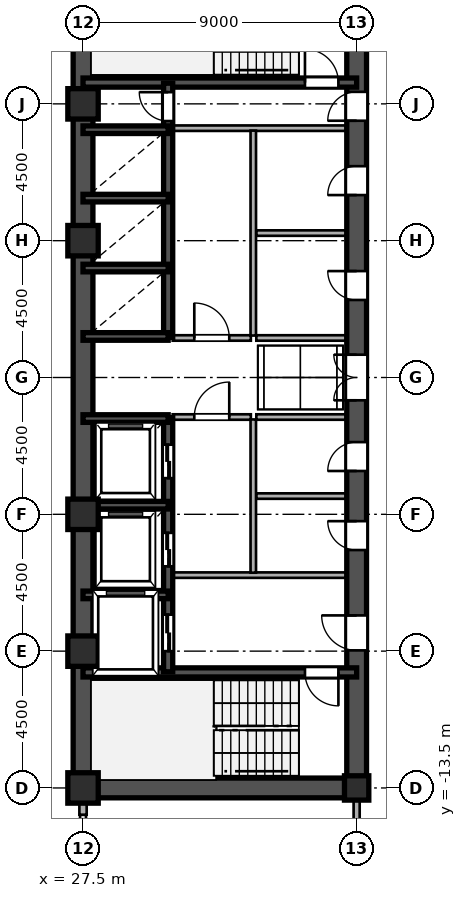
"""IFC4 building model, lengths in metres.
Left out: names, types, materials, properties, quantities, classifications, styles, units other than length and angle.
Written with IfcOpenShell. Run it as: python <this file> out.ifc"""

import sys

from ifc_helpers import new_model, si_unit, direction, frame, frame_2d, origin, origin_2d, place, context, subcontext, project, spatial, rectangle, hollow_rectangle, i_section, extrude, source, transform, mapped, element, fill, save


model = new_model("IFC4")
c1 = context("Model", 3, precision=1e-05, world=origin(), true_north=direction((0.0, 1.0)))
c2 = subcontext(c1, "Body", "Model", "MODEL_VIEW")
j1 = project(units=[si_unit("LENGTHUNIT", "METRE"), si_unit("PLANEANGLEUNIT", "RADIAN")], contexts=[c1])
p1 = place(None, origin())
s1 = spatial("IfcSite", under=j1, at=p1, CompositionType="ELEMENT")
p2 = place(p1, origin())
s2 = spatial("IfcBuilding", under=s1, at=p2, CompositionType="ELEMENT")
p3 = place(p2, frame((0.0, 0.0, 92.4)))
s3 = spatial("IfcBuildingStorey", under=s2, at=p3, CompositionType="ELEMENT", Elevation=92.4)
m1 = source(origin(), c2, "Body", "SweptSolid", [
    extrude(hollow_rectangle(XDim=1.0, YDim=1.0, WallThickness=0.042, at=origin_2d()), origin(), (0.0, 0.0, 1.0), 3.6),
])
for number, where, z_axis, x_axis in (
    (1, (27.5, -13.5, 0.0), (0.0, 0.0, 1.0), (1.0, 0.0, 0.0)),
    (2, (27.5, -9.0, 0.0), (0.0, 0.0, 1.0), (1.0, 0.0, 0.0)),
    (3, (27.5, -4.5, 0.0), (0.0, 0.0, 1.0), (1.0, 0.0, 0.0)),
    (4, (27.5, 4.5, 0.0), (0.0, 0.0, 1.0), (1.0, 0.0, 0.0)),
    (5, (27.5, 9.0, 0.0), (0.0, 0.0, 1.0), (1.0, 0.0, 0.0)),
):
    element("IfcColumn", number, at=place(p3, frame(where, z_axis=z_axis, x_axis=x_axis)), inside=s3, PredefinedType="COLUMN", context=c2, shape_type="MappedRepresentation", body=[
        mapped(m1, transform((0.0, 0.0, 0.0), scale=1.0)),
    ])
m2 = source(origin(), c2, "Body", "SweptSolid", [
    extrude(i_section(OverallWidth=0.8, OverallDepth=0.8, WebThickness=0.032, FlangeThickness=0.05, at=origin_2d()), origin(), (0.0, 0.0, 1.0), 3.6),
])
p4 = place(p3, frame((36.5, -13.5, 0.0), z_axis=(0.0, 0.0, 1.0), x_axis=(1.0, 0.0, 0.0)))
e6 = element("IfcColumn", 6, at=p4, inside=s3, PredefinedType="COLUMN", context=c2, shape_type="MappedRepresentation", body=[
    mapped(m2, transform((0.0, 0.0, 0.0), scale=1.0)),
])
p5 = place(p3, frame((27.5, -14.38, 0.0), z_axis=(0.0, 0.0, 1.0), x_axis=(0.0, 1.0, 0.0)))
e7 = element("IfcWall", 7, at=p5, inside=s3, PredefinedType="SOLIDWALL", context=c2, shape_type="SweptSolid", body=[
    extrude(rectangle(XDim=0.55, YDim=0.24, at=frame_2d((0.275, 0.0))), origin(), (0.0, 0.0, 1.0), 2.88),
])
for number, where, z_axis, x_axis in (
    (8, (27.5, -13.5, 0.0), (0.0, 0.0, 1.0), (0.0, 1.0, 0.0)),
    (9, (27.5, 1.3, 0.0), (0.0, 0.0, 1.0), (0.0, 1.0, 0.0)),
):
    element("IfcWall", number, at=place(p3, frame(where, z_axis=z_axis, x_axis=x_axis)), inside=s3, PredefinedType="SHEAR", context=c2, shape_type="SweptSolid", body=[
        extrude(rectangle(XDim=12.2, YDim=0.65, at=frame_2d((6.1, 0.0))), origin(), (0.0, 0.0, 1.0), 3.38),
    ])
p6 = place(p3, frame((27.5, -1.3, 0.0), z_axis=(0.0, 0.0, 1.0), x_axis=(0.0, 1.0, 0.0)))
e10 = element("IfcWall", 10, at=p6, inside=s3, PredefinedType="SHEAR", context=c2, shape_type="SweptSolid", body=[
    extrude(rectangle(XDim=2.6, YDim=0.65, at=frame_2d((1.3, 0.0))), origin(), (0.0, 0.0, 1.0), 3.38),
])
p7 = place(p3, frame((27.5, -13.5, 0.0), z_axis=(0.0, 0.0, 1.0), x_axis=(1.0, 0.0, 0.0)))
e11 = element("IfcWall", 11, at=p7, inside=s3, PredefinedType="SHEAR", context=c2, shape_type="SweptSolid", body=[
    extrude(rectangle(XDim=9.0, YDim=0.65, at=frame_2d((4.5, 0.0))), origin(), (0.0, 0.0, 1.0), 3.38),
])
p8 = place(p3, frame((36.5, -13.65, 0.0), z_axis=(0.0, 0.0, 1.0), x_axis=(0.0, 1.0, 0.0)))
e12 = element("IfcWall", 12, at=p8, inside=s3, PredefinedType="SHEAR", context=c2, shape_type="SweptSolid", body=[
    extrude(rectangle(XDim=7.15, YDim=0.65, at=frame_2d((3.575, 0.0))), origin(), (0.0, 0.0, 1.0), 3.38),
])
p9 = place(p8, frame((4.675, 0.0, 0.0)))
e13 = element("IfcOpeningElement", 13, at=p9, cuts=e12, PredefinedType="OPENING", context=c2, shape_type="SweptSolid", body=[
    extrude(rectangle(XDim=1.15, YDim=2.2, at=frame_2d((0.575, 1.1))), frame((0.0, 0.335, 0.0), z_axis=(0.0, -1.0, 0.0), x_axis=(1.0, 0.0, 0.0)), (0.0, 0.0, 1.0), 0.67),
])
p10 = place(p3, frame((36.5, -1.3, 0.0), z_axis=(0.0, 0.0, 1.0), x_axis=(0.0, 1.0, 0.0)))
e14 = element("IfcWall", 14, at=p10, inside=s3, PredefinedType="SHEAR", context=c2, shape_type="SweptSolid", body=[
    extrude(rectangle(XDim=2.6, YDim=0.65, at=frame_2d((1.3, 0.0))), origin(), (0.0, 0.0, 1.0), 3.38),
])
p11 = place(p10, frame((0.55, 0.0, 0.0)))
e15 = element("IfcOpeningElement", 15, at=p11, cuts=e14, PredefinedType="OPENING", context=c2, shape_type="SweptSolid", body=[
    extrude(rectangle(XDim=1.5, YDim=2.3, at=frame_2d((0.75, 1.15))), frame((0.0, 0.335, 0.0), z_axis=(0.0, -1.0, 0.0), x_axis=(1.0, 0.0, 0.0)), (0.0, 0.0, 1.0), 0.67),
])
p12 = place(p3, frame((36.5, 8.2, 0.0), z_axis=(0.0, 0.0, 1.0), x_axis=(0.0, 1.0, 0.0)))
e16 = element("IfcWall", 16, at=p12, inside=s3, PredefinedType="SHEAR", context=c2, shape_type="SweptSolid", body=[
    extrude(rectangle(XDim=5.45, YDim=0.65, at=frame_2d((2.725, 0.0))), origin(), (0.0, 0.0, 1.0), 3.38),
])
p13 = place(p12, frame((0.245, 0.0, 0.0)))
e17 = element("IfcOpeningElement", 17, at=p13, cuts=e16, PredefinedType="OPENING", context=c2, shape_type="SweptSolid", body=[
    extrude(rectangle(XDim=0.95, YDim=2.15, at=frame_2d((0.475, 1.075))), frame((0.0, 0.335, 0.0), z_axis=(0.0, -1.0, 0.0), x_axis=(1.0, 0.0, 0.0)), (0.0, 0.0, 1.0), 0.67),
])
p14 = place(p3, frame((36.5, -6.5, 0.0), z_axis=(0.0, 0.0, 1.0), x_axis=(0.0, 1.0, 0.0)))
e18 = element("IfcWall", 18, at=p14, inside=s3, PredefinedType="SHEAR", context=c2, shape_type="SweptSolid", body=[
    extrude(rectangle(XDim=2.6, YDim=0.65, at=frame_2d((1.3, 0.0))), origin(), (0.0, 0.0, 1.0), 3.38),
])
p15 = place(p14, frame((0.825, 0.0, 0.0)))
e19 = element("IfcOpeningElement", 19, at=p15, cuts=e18, PredefinedType="OPENING", context=c2, shape_type="SweptSolid", body=[
    extrude(rectangle(XDim=0.95, YDim=2.15, at=frame_2d((0.475, 1.075))), frame((0.0, 0.335, 0.0), z_axis=(0.0, -1.0, 0.0), x_axis=(1.0, 0.0, 0.0)), (0.0, 0.0, 1.0), 0.67),
])
p16 = place(p3, frame((36.5, -3.9, 0.0), z_axis=(0.0, 0.0, 1.0), x_axis=(0.0, 1.0, 0.0)))
e20 = element("IfcWall", 20, at=p16, inside=s3, PredefinedType="SHEAR", context=c2, shape_type="SweptSolid", body=[
    extrude(rectangle(XDim=2.6, YDim=0.65, at=frame_2d((1.3, 0.0))), origin(), (0.0, 0.0, 1.0), 3.38),
])
p17 = place(p16, frame((0.825, 0.0, 0.0)))
e21 = element("IfcOpeningElement", 21, at=p17, cuts=e20, PredefinedType="OPENING", context=c2, shape_type="SweptSolid", body=[
    extrude(rectangle(XDim=0.95, YDim=2.15, at=frame_2d((0.475, 1.075))), frame((0.0, 0.335, 0.0), z_axis=(0.0, -1.0, 0.0), x_axis=(1.0, 0.0, 0.0)), (0.0, 0.0, 1.0), 0.67),
])
p18 = place(p3, frame((36.5, 1.3, 0.0), z_axis=(0.0, 0.0, 1.0), x_axis=(0.0, 1.0, 0.0)))
e22 = element("IfcWall", 22, at=p18, inside=s3, PredefinedType="SHEAR", context=c2, shape_type="SweptSolid", body=[
    extrude(rectangle(XDim=3.45, YDim=0.65, at=frame_2d((1.725, 0.0))), origin(), (0.0, 0.0, 1.0), 3.38),
])
p19 = place(p18, frame((1.25, 0.0, 0.0)))
e23 = element("IfcOpeningElement", 23, at=p19, cuts=e22, PredefinedType="OPENING", context=c2, shape_type="SweptSolid", body=[
    extrude(rectangle(XDim=0.95, YDim=2.15, at=frame_2d((0.475, 1.075))), frame((0.0, 0.335, 0.0), z_axis=(0.0, -1.0, 0.0), x_axis=(1.0, 0.0, 0.0)), (0.0, 0.0, 1.0), 0.67),
])
p20 = place(p3, frame((36.5, 4.75, 0.0), z_axis=(0.0, 0.0, 1.0), x_axis=(0.0, 1.0, 0.0)))
e24 = element("IfcWall", 24, at=p20, inside=s3, PredefinedType="SHEAR", context=c2, shape_type="SweptSolid", body=[
    extrude(rectangle(XDim=3.45, YDim=0.65, at=frame_2d((1.725, 0.0))), origin(), (0.0, 0.0, 1.0), 3.38),
])
p21 = place(p20, frame((1.25, 0.0, 0.0)))
e25 = element("IfcOpeningElement", 25, at=p21, cuts=e24, PredefinedType="OPENING", context=c2, shape_type="SweptSolid", body=[
    extrude(rectangle(XDim=0.95, YDim=2.15, at=frame_2d((0.475, 1.075))), frame((0.0, 0.335, 0.0), z_axis=(0.0, -1.0, 0.0), x_axis=(1.0, 0.0, 0.0)), (0.0, 0.0, 1.0), 0.67),
])
p22 = place(p3, frame((27.5, -9.7, 0.0), z_axis=(0.0, 0.0, 1.0), x_axis=(1.0, 0.0, 0.0)))
e26 = element("IfcWall", 26, at=p22, inside=s3, PredefinedType="SHEAR", context=c2, shape_type="SweptSolid", body=[
    extrude(rectangle(XDim=9.0, YDim=0.3, at=frame_2d((4.5, 0.0))), origin(), (0.0, 0.0, 1.0), 3.38),
])
p23 = place(p22, frame((7.3, 0.0, 0.0)))
e27 = element("IfcOpeningElement", 27, at=p23, cuts=e26, PredefinedType="OPENING", context=c2, shape_type="SweptSolid", body=[
    extrude(rectangle(XDim=1.1, YDim=2.2, at=frame_2d((0.55, 1.1))), frame((0.0, 0.16, 0.0), z_axis=(0.0, -1.0, 0.0), x_axis=(1.0, 0.0, 0.0)), (0.0, 0.0, 1.0), 0.32),
])
p24 = place(p3, frame((27.5, 9.7, 0.0), z_axis=(0.0, 0.0, 1.0), x_axis=(1.0, 0.0, 0.0)))
e28 = element("IfcWall", 28, at=p24, inside=s3, PredefinedType="SHEAR", context=c2, shape_type="SweptSolid", body=[
    extrude(rectangle(XDim=9.0, YDim=0.3, at=frame_2d((4.5, 0.0))), origin(), (0.0, 0.0, 1.0), 3.38),
])
p25 = place(p24, frame((7.3, 0.0, 0.0)))
e29 = element("IfcOpeningElement", 29, at=p25, cuts=e28, PredefinedType="OPENING", context=c2, shape_type="SweptSolid", body=[
    extrude(rectangle(XDim=1.1, YDim=2.2, at=frame_2d((0.55, 1.1))), frame((0.0, 0.16, 0.0), z_axis=(0.0, -1.0, 0.0), x_axis=(1.0, 0.0, 0.0)), (0.0, 0.0, 1.0), 0.32),
])
for number, where, z_axis, x_axis in (
    (30, (27.5, -7.15, 0.0), (0.0, 0.0, 1.0), (1.0, 0.0, 0.0)),
    (31, (27.5, -4.2, 0.0), (0.0, 0.0, 1.0), (1.0, 0.0, 0.0)),
    (32, (27.5, -1.35, 0.0), (0.0, 0.0, 1.0), (1.0, 0.0, 0.0)),
    (33, (27.5, 1.35, 0.0), (0.0, 0.0, 1.0), (1.0, 0.0, 0.0)),
    (34, (27.5, 3.6, 0.0), (0.0, 0.0, 1.0), (1.0, 0.0, 0.0)),
    (35, (27.5, 5.9, 0.0), (0.0, 0.0, 1.0), (1.0, 0.0, 0.0)),
    (36, (27.5, 8.15, 0.0), (0.0, 0.0, 1.0), (1.0, 0.0, 0.0)),
):
    element("IfcWall", number, at=place(p3, frame(where, z_axis=z_axis, x_axis=x_axis)), inside=s3, PredefinedType="SHEAR", context=c2, shape_type="SweptSolid", body=[
        extrude(rectangle(XDim=2.8, YDim=0.25, at=frame_2d((1.4, 0.0))), origin(), (0.0, 0.0, 1.0), 3.38),
    ])
p26 = place(p3, frame((30.3, -9.68, 0.0), z_axis=(0.0, 0.0, 1.0), x_axis=(0.0, 1.0, 0.0)))
e37 = element("IfcWall", 37, at=p26, inside=s3, PredefinedType="SHEAR", context=c2, shape_type="SweptSolid", body=[
    extrude(rectangle(XDim=2.56, YDim=0.3, at=frame_2d((1.28, 0.0))), origin(), (0.0, 0.0, 1.0), 3.38),
])
p27 = place(p26, frame((0.68, 0.0, 0.0)))
e38 = element("IfcOpeningElement", 38, at=p27, cuts=e37, PredefinedType="OPENING", context=c2, shape_type="SweptSolid", body=[
    extrude(rectangle(XDim=1.2, YDim=2.25, at=frame_2d((0.6, 1.125))), frame((0.0, 0.16, 0.0), z_axis=(0.0, -1.0, 0.0), x_axis=(1.0, 0.0, 0.0)), (0.0, 0.0, 1.0), 0.32),
])
p28 = place(p3, frame((30.3, -7.12, 0.0), z_axis=(0.0, 0.0, 1.0), x_axis=(0.0, 1.0, 0.0)))
e39 = element("IfcWall", 39, at=p28, inside=s3, PredefinedType="SHEAR", context=c2, shape_type="SweptSolid", body=[
    extrude(rectangle(XDim=2.92, YDim=0.3, at=frame_2d((1.46, 0.0))), origin(), (0.0, 0.0, 1.0), 3.38),
])
p29 = place(p28, frame((0.91, 0.0, 0.0)))
e40 = element("IfcOpeningElement", 40, at=p29, cuts=e39, PredefinedType="OPENING", context=c2, shape_type="SweptSolid", body=[
    extrude(rectangle(XDim=1.1, YDim=2.2, at=frame_2d((0.55, 1.1))), frame((0.0, 0.16, 0.0), z_axis=(0.0, -1.0, 0.0), x_axis=(1.0, 0.0, 0.0)), (0.0, 0.0, 1.0), 0.32),
])
p30 = place(p3, frame((30.3, -4.2, 0.0), z_axis=(0.0, 0.0, 1.0), x_axis=(0.0, 1.0, 0.0)))
e41 = element("IfcWall", 41, at=p30, inside=s3, PredefinedType="SHEAR", context=c2, shape_type="SweptSolid", body=[
    extrude(rectangle(XDim=2.88, YDim=0.3, at=frame_2d((1.44, 0.0))), origin(), (0.0, 0.0, 1.0), 3.38),
])
p31 = place(p30, frame((0.89, 0.0, 0.0)))
e42 = element("IfcOpeningElement", 42, at=p31, cuts=e41, PredefinedType="OPENING", context=c2, shape_type="SweptSolid", body=[
    extrude(rectangle(XDim=1.1, YDim=2.2, at=frame_2d((0.55, 1.1))), frame((0.0, 0.16, 0.0), z_axis=(0.0, -1.0, 0.0), x_axis=(1.0, 0.0, 0.0)), (0.0, 0.0, 1.0), 0.32),
])
p32 = place(p3, frame((30.3, 1.32, 0.0), z_axis=(0.0, 0.0, 1.0), x_axis=(0.0, 1.0, 0.0)))
e43 = element("IfcWall", 43, at=p32, inside=s3, PredefinedType="SHEAR", context=c2, shape_type="SweptSolid", body=[
    extrude(rectangle(XDim=2.28, YDim=0.3, at=frame_2d((1.14, 0.0))), origin(), (0.0, 0.0, 1.0), 3.38),
])
p33 = place(p3, frame((30.3, 3.6, 0.0), z_axis=(0.0, 0.0, 1.0), x_axis=(0.0, 1.0, 0.0)))
e44 = element("IfcWall", 44, at=p33, inside=s3, PredefinedType="SHEAR", context=c2, shape_type="SweptSolid", body=[
    extrude(rectangle(XDim=2.3, YDim=0.3, at=frame_2d((1.15, 0.0))), origin(), (0.0, 0.0, 1.0), 3.38),
])
p34 = place(p3, frame((30.3, 5.9, 0.0), z_axis=(0.0, 0.0, 1.0), x_axis=(0.0, 1.0, 0.0)))
e45 = element("IfcWall", 45, at=p34, inside=s3, PredefinedType="SHEAR", context=c2, shape_type="SweptSolid", body=[
    extrude(rectangle(XDim=2.25, YDim=0.3, at=frame_2d((1.125, 0.0))), origin(), (0.0, 0.0, 1.0), 3.38),
])
p35 = place(p3, frame((30.3, 8.15, 0.0), z_axis=(0.0, 0.0, 1.0), x_axis=(0.0, 1.0, 0.0)))
e46 = element("IfcWall", 46, at=p35, inside=s3, PredefinedType="SHEAR", context=c2, shape_type="SweptSolid", body=[
    extrude(rectangle(XDim=1.53, YDim=0.3, at=frame_2d((0.765, 0.0))), origin(), (0.0, 0.0, 1.0), 3.38),
])
p36 = place(p35, frame((0.285, 0.0, 0.0)))
e47 = element("IfcOpeningElement", 47, at=p36, cuts=e46, PredefinedType="OPENING", context=c2, shape_type="SweptSolid", body=[
    extrude(rectangle(XDim=0.95, YDim=2.15, at=frame_2d((0.475, 1.075))), frame((0.0, 0.16, 0.0), z_axis=(0.0, -1.0, 0.0), x_axis=(1.0, 0.0, 0.0)), (0.0, 0.0, 1.0), 0.32),
])
for number, where, z_axis, x_axis in (
    (48, (30.45, -6.5, 0.0), (0.0, 0.0, 1.0), (1.0, 0.0, 0.0)),
    (49, (30.45, 8.2, 0.0), (0.0, 0.0, 1.0), (1.0, 0.0, 0.0)),
):
    element("IfcWall", number, at=place(p3, frame(where, z_axis=z_axis, x_axis=x_axis)), inside=s3, PredefinedType="PARTITIONING", context=c2, shape_type="SweptSolid", body=[
        extrude(rectangle(XDim=5.7, YDim=0.18, at=frame_2d((2.85, 0.0))), origin(), (0.0, 0.0, 1.0), 3.38),
    ])
p37 = place(p3, frame((33.1, -6.42, 0.0), z_axis=(0.0, 0.0, 1.0), x_axis=(0.0, 1.0, 0.0)))
e50 = element("IfcWall", 50, at=p37, inside=s3, PredefinedType="PARTITIONING", context=c2, shape_type="SweptSolid", body=[
    extrude(rectangle(XDim=5.04, YDim=0.18, at=frame_2d((2.52, 0.0))), origin(), (0.0, 0.0, 1.0), 3.38),
])
p38 = place(p3, frame((33.1, 1.38, 0.0), z_axis=(0.0, 0.0, 1.0), x_axis=(0.0, 1.0, 0.0)))
e51 = element("IfcWall", 51, at=p38, inside=s3, PredefinedType="PARTITIONING", context=c2, shape_type="SweptSolid", body=[
    extrude(rectangle(XDim=6.74, YDim=0.18, at=frame_2d((3.37, 0.0))), origin(), (0.0, 0.0, 1.0), 3.38),
])
p39 = place(p3, frame((30.45, -1.3, 0.0), z_axis=(0.0, 0.0, 1.0), x_axis=(1.0, 0.0, 0.0)))
e52 = element("IfcWall", 52, at=p39, inside=s3, PredefinedType="PARTITIONING", context=c2, shape_type="SweptSolid", body=[
    extrude(rectangle(XDim=2.57, YDim=0.18, at=frame_2d((1.285, 0.0))), origin(), (0.0, 0.0, 1.0), 3.38),
])
p40 = place(p39, frame((0.71, 0.0, 0.0)))
e53 = element("IfcOpeningElement", 53, at=p40, cuts=e52, PredefinedType="OPENING", context=c2, shape_type="SweptSolid", body=[
    extrude(rectangle(XDim=1.15, YDim=2.2, at=frame_2d((0.575, 1.1))), frame((0.0, 0.1, 0.0), z_axis=(0.0, -1.0, 0.0), x_axis=(1.0, 0.0, 0.0)), (0.0, 0.0, 1.0), 0.2),
])
p41 = place(p3, frame((30.45, 1.3, 0.0), z_axis=(0.0, 0.0, 1.0), x_axis=(1.0, 0.0, 0.0)))
e54 = element("IfcWall", 54, at=p41, inside=s3, PredefinedType="PARTITIONING", context=c2, shape_type="SweptSolid", body=[
    extrude(rectangle(XDim=2.57, YDim=0.18, at=frame_2d((1.285, 0.0))), origin(), (0.0, 0.0, 1.0), 3.38),
])
p42 = place(p41, frame((0.71, 0.0, 0.0)))
e55 = element("IfcOpeningElement", 55, at=p42, cuts=e54, PredefinedType="OPENING", context=c2, shape_type="SweptSolid", body=[
    extrude(rectangle(XDim=1.15, YDim=2.2, at=frame_2d((0.575, 1.1))), frame((0.0, 0.1, 0.0), z_axis=(0.0, -1.0, 0.0), x_axis=(1.0, 0.0, 0.0)), (0.0, 0.0, 1.0), 0.2),
])
for number, where, z_axis, x_axis in (
    (56, (33.2, -1.3, 0.0), (0.0, 0.0, 1.0), (1.0, 0.0, 0.0)),
    (57, (33.2, 1.3, 0.0), (0.0, 0.0, 1.0), (1.0, 0.0, 0.0)),
    (58, (33.2, -3.9, 0.0), (0.0, 0.0, 1.0), (1.0, 0.0, 0.0)),
    (59, (33.2, 4.75, 0.0), (0.0, 0.0, 1.0), (1.0, 0.0, 0.0)),
):
    element("IfcWall", number, at=place(p3, frame(where, z_axis=z_axis, x_axis=x_axis)), inside=s3, PredefinedType="PARTITIONING", context=c2, shape_type="SweptSolid", body=[
        extrude(rectangle(XDim=2.95, YDim=0.18, at=frame_2d((1.475, 0.0))), origin(), (0.0, 0.0, 1.0), 3.38),
    ])
p43 = place(p3, frame((36.5, -15.515, 0.0), z_axis=(0.0, 0.0, 1.0), x_axis=(0.0, 1.0, 0.0)))
e60 = element("IfcWall", 60, at=p43, inside=s3, PredefinedType="PARTITIONING", context=c2, shape_type="SweptSolid", body=[
    extrude(rectangle(XDim=1.685, YDim=0.2, at=frame_2d((0.842, 0.0))), origin(), (0.0, 0.0, 1.0), 2.68),
])
m3 = source(origin(), c2, "Body", "SweptSolid", [
    extrude(rectangle(XDim=1.15, YDim=2.2, at=frame_2d((0.575, 1.1))), frame((0.0, 0.025, 0.0), z_axis=(0.0, -1.0, 0.0), x_axis=(1.0, 0.0, 0.0)), (0.0, 0.0, 1.0), 0.05),
])
p44 = place(p9, origin())
e61 = element("IfcDoor", 61, at=p44, inside=s3, OperationType="SINGLE_SWING_RIGHT", PredefinedType="DOOR", context=c2, shape_type="MappedRepresentation", body=[
    mapped(m3, transform((0.0, 0.0, 0.0), scale=1.0)),
])
fill(e13, e61)
m4 = source(origin(), c2, "Body", "SweptSolid", [
    extrude(rectangle(XDim=1.5, YDim=2.3, at=frame_2d((0.75, 1.15))), frame((0.0, 0.025, 0.0), z_axis=(0.0, -1.0, 0.0), x_axis=(1.0, 0.0, 0.0)), (0.0, 0.0, 1.0), 0.05),
])
p45 = place(p11, origin())
e62 = element("IfcDoor", 62, at=p45, inside=s3, OperationType="DOUBLE_SWING_LEFT", PredefinedType="DOOR", context=c2, shape_type="MappedRepresentation", body=[
    mapped(m4, transform((0.0, 0.0, 0.0), scale=1.0)),
])
fill(e15, e62)
m5 = source(origin(), c2, "Body", "SweptSolid", [
    extrude(rectangle(XDim=0.95, YDim=2.15, at=frame_2d((0.475, 1.075))), frame((0.0, 0.025, 0.0), z_axis=(0.0, -1.0, 0.0), x_axis=(1.0, 0.0, 0.0)), (0.0, 0.0, 1.0), 0.05),
])
p46 = place(p13, origin())
e63 = element("IfcDoor", 63, at=p46, inside=s3, OperationType="SINGLE_SWING_LEFT", PredefinedType="DOOR", context=c2, shape_type="MappedRepresentation", body=[
    mapped(m5, transform((0.0, 0.0, 0.0), scale=1.0)),
])
fill(e17, e63)
p47 = place(p15, origin())
e64 = element("IfcDoor", 64, at=p47, inside=s3, OperationType="SINGLE_SWING_RIGHT", PredefinedType="DOOR", context=c2, shape_type="MappedRepresentation", body=[
    mapped(m5, transform((0.0, 0.0, 0.0), scale=1.0)),
])
fill(e19, e64)
p48 = place(p17, origin())
e65 = element("IfcDoor", 65, at=p48, inside=s3, OperationType="SINGLE_SWING_LEFT", PredefinedType="DOOR", context=c2, shape_type="MappedRepresentation", body=[
    mapped(m5, transform((0.0, 0.0, 0.0), scale=1.0)),
])
fill(e21, e65)
p49 = place(p19, origin())
e66 = element("IfcDoor", 66, at=p49, inside=s3, OperationType="SINGLE_SWING_RIGHT", PredefinedType="DOOR", context=c2, shape_type="MappedRepresentation", body=[
    mapped(m5, transform((0.0, 0.0, 0.0), scale=1.0)),
])
fill(e23, e66)
p50 = place(p21, origin())
e67 = element("IfcDoor", 67, at=p50, inside=s3, OperationType="SINGLE_SWING_LEFT", PredefinedType="DOOR", context=c2, shape_type="MappedRepresentation", body=[
    mapped(m5, transform((0.0, 0.0, 0.0), scale=1.0)),
])
fill(e25, e67)
m6 = source(origin(), c2, "Body", "SweptSolid", [
    extrude(rectangle(XDim=1.1, YDim=2.2, at=frame_2d((0.55, 1.1))), frame((0.0, 0.025, 0.0), z_axis=(0.0, -1.0, 0.0), x_axis=(1.0, 0.0, 0.0)), (0.0, 0.0, 1.0), 0.05),
])
p51 = place(p23, frame((1.1, 0.0, 0.0), z_axis=(0.0, 0.0, 1.0), x_axis=(-1.0, 0.0, 0.0)))
e68 = element("IfcDoor", 68, at=p51, inside=s3, OperationType="SINGLE_SWING_RIGHT", PredefinedType="DOOR", context=c2, shape_type="MappedRepresentation", body=[
    mapped(m6, transform((0.0, 0.0, 0.0), scale=1.0)),
])
fill(e27, e68)
p52 = place(p25, origin())
e69 = element("IfcDoor", 69, at=p52, inside=s3, OperationType="SINGLE_SWING_LEFT", PredefinedType="DOOR", context=c2, shape_type="MappedRepresentation", body=[
    mapped(m6, transform((0.0, 0.0, 0.0), scale=1.0)),
])
fill(e29, e69)
m7 = source(origin(), c2, "Body", "SweptSolid", [
    extrude(rectangle(XDim=1.2, YDim=2.25, at=frame_2d((0.6, 1.125))), frame((0.0, 0.025, 0.0), z_axis=(0.0, -1.0, 0.0), x_axis=(1.0, 0.0, 0.0)), (0.0, 0.0, 1.0), 0.05),
])
p53 = place(p27, origin())
e70 = element("IfcDoor", 70, at=p53, inside=s3, OperationType="DOUBLE_DOOR_SLIDING", PredefinedType="DOOR", context=c2, shape_type="MappedRepresentation", body=[
    mapped(m7, transform((0.0, 0.0, 0.0), scale=1.0)),
])
fill(e38, e70)
m8 = source(origin(), c2, "Body", "SweptSolid", [
    extrude(rectangle(XDim=1.1, YDim=2.2, at=frame_2d((0.55, 1.1))), frame((0.0, 0.025, 0.0), z_axis=(0.0, -1.0, 0.0), x_axis=(1.0, 0.0, 0.0)), (0.0, 0.0, 1.0), 0.05),
])
p54 = place(p29, origin())
e71 = element("IfcDoor", 71, at=p54, inside=s3, OperationType="DOUBLE_DOOR_SLIDING", PredefinedType="DOOR", context=c2, shape_type="MappedRepresentation", body=[
    mapped(m8, transform((0.0, 0.0, 0.0), scale=1.0)),
])
fill(e40, e71)
p55 = place(p31, origin())
e72 = element("IfcDoor", 72, at=p55, inside=s3, OperationType="DOUBLE_DOOR_SLIDING", PredefinedType="DOOR", context=c2, shape_type="MappedRepresentation", body=[
    mapped(m8, transform((0.0, 0.0, 0.0), scale=1.0)),
])
fill(e42, e72)
p56 = place(p36, origin())
e73 = element("IfcDoor", 73, at=p56, inside=s3, OperationType="SINGLE_SWING_RIGHT", PredefinedType="DOOR", context=c2, shape_type="MappedRepresentation", body=[
    mapped(m5, transform((0.0, 0.0, 0.0), scale=1.0)),
])
fill(e47, e73)
p57 = place(p40, origin())
e74 = element("IfcDoor", 74, at=p57, inside=s3, OperationType="SINGLE_SWING_RIGHT", PredefinedType="DOOR", context=c2, shape_type="MappedRepresentation", body=[
    mapped(m3, transform((0.0, 0.0, 0.0), scale=1.0)),
])
fill(e53, e74)
p58 = place(p42, origin())
e75 = element("IfcDoor", 75, at=p58, inside=s3, OperationType="SINGLE_SWING_LEFT", PredefinedType="DOOR", context=c2, shape_type="MappedRepresentation", body=[
    mapped(m3, transform((0.0, 0.0, 0.0), scale=1.0)),
])
fill(e55, e75)
save(model, sys.argv[1])
